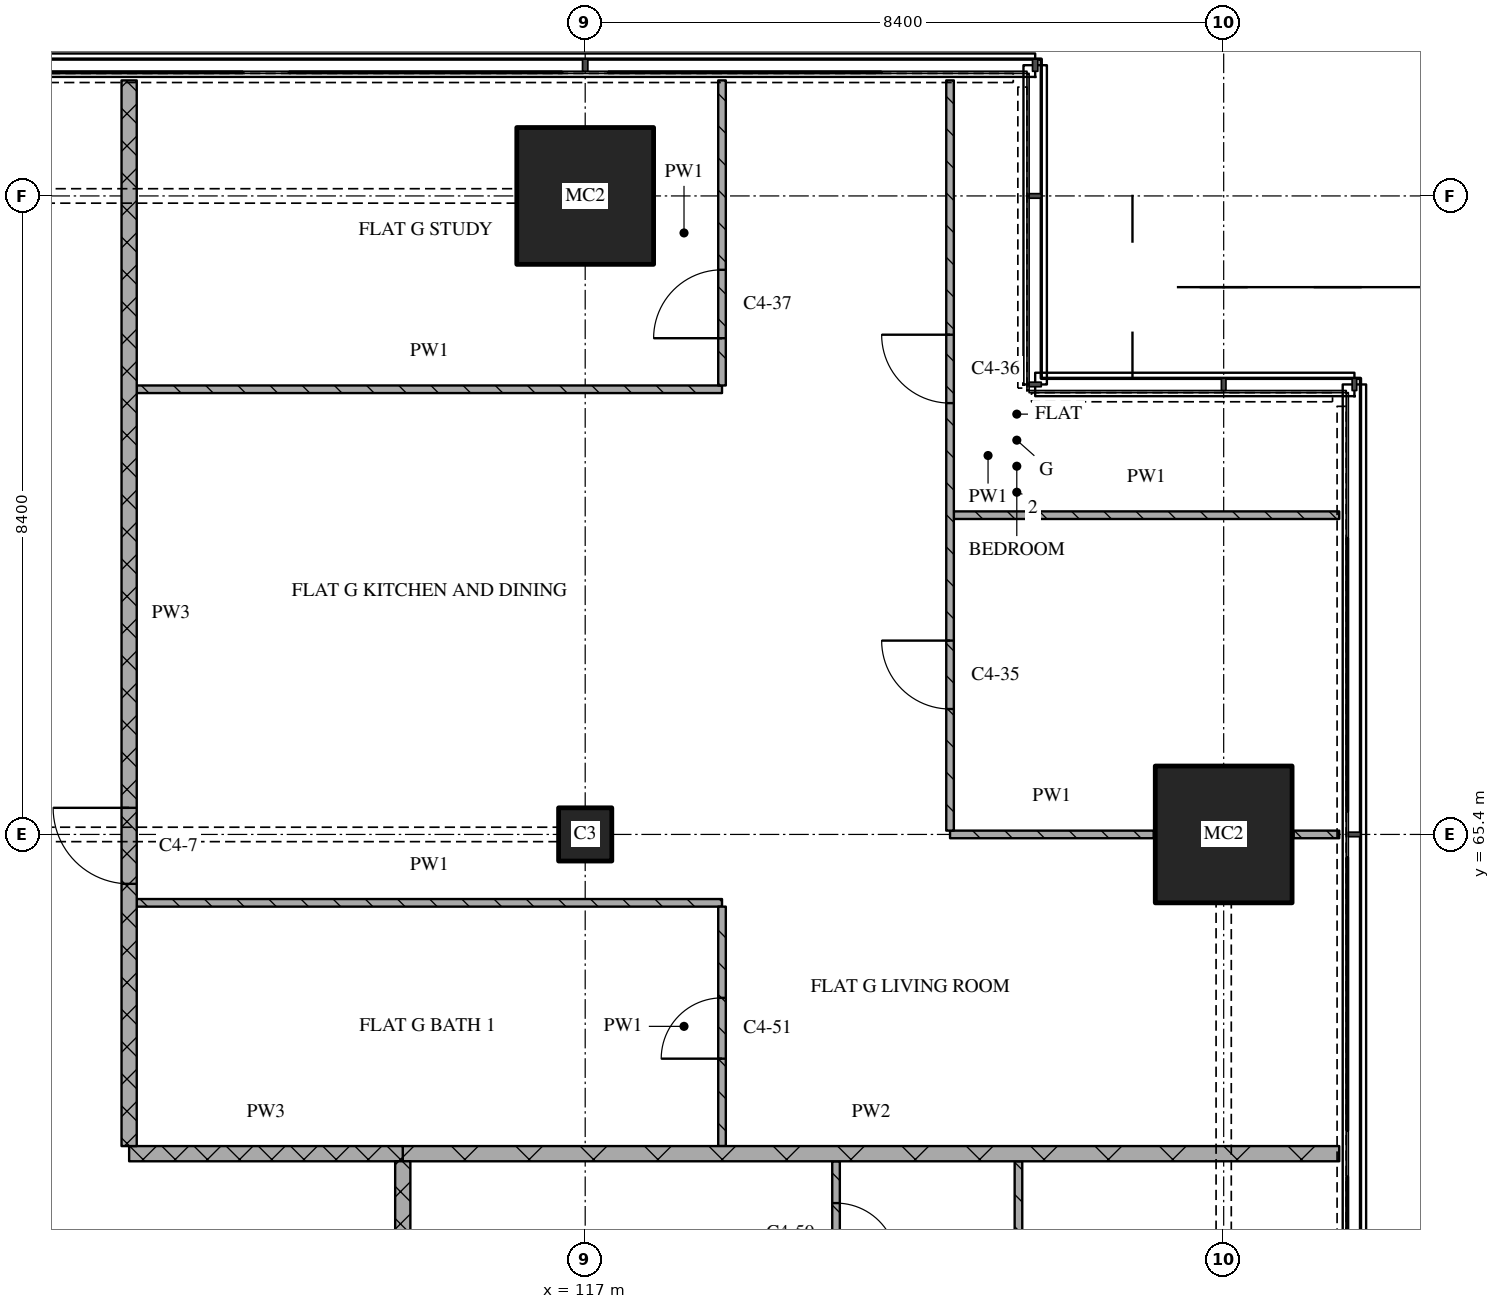
"""IFC4 building model, lengths in metres.
Left out: names, types, materials, properties, quantities, classifications, styles, units other than length and angle.
Written with IfcOpenShell. Run it as: python <this file> out.ifc"""

import sys

from ifc_helpers import new_model, si_unit, direction, frame, frame_2d, origin, origin_2d, place, context, subcontext, project, spatial, rectangle, extrude, element, fill, save


model = new_model("IFC4")
c1 = context("Model", 3, precision=1e-05, world=origin(), true_north=direction((0.0, 1.0)))
c2 = subcontext(c1, "Body", "Model", "MODEL_VIEW")
j1 = project(units=[si_unit("LENGTHUNIT", "METRE"), si_unit("PLANEANGLEUNIT", "RADIAN")], contexts=[c1])
p1 = place(None, origin())
s1 = spatial("IfcSite", under=j1, at=p1, CompositionType="ELEMENT")
p2 = place(p1, origin())
s2 = spatial("IfcBuilding", under=s1, at=p2, CompositionType="ELEMENT")
p3 = place(p2, frame((0.0, 0.0, 187.05)))
s3 = spatial("IfcBuildingStorey", under=s2, at=p3, CompositionType="ELEMENT", Elevation=187.05)
p4 = place(p3, frame((117.0, 65.4, 0.0), z_axis=(0.0, 0.0, 1.0), x_axis=(1.0, 0.0, 0.0)))
e1 = element("IfcColumn", 1, at=p4, inside=s3, PredefinedType="COLUMN", context=c2, shape_type="SweptSolid", body=[
    extrude(rectangle(XDim=0.7, YDim=0.7, at=origin_2d()), origin(), (0.0, 0.0, 1.0), 3.6),
])
for number, where, z_axis, x_axis in (
    (2, (117.0, 73.8, 0.0), (0.0, 0.0, 1.0), (1.0, 0.0, 0.0)),
    (3, (125.4, 65.4, 0.0), (0.0, 0.0, 1.0), (1.0, 0.0, 0.0)),
):
    element("IfcColumn", number, at=place(p3, frame(where, z_axis=z_axis, x_axis=x_axis)), inside=s3, PredefinedType="COLUMN", context=c2, shape_type="SweptSolid", body=[
        extrude(rectangle(XDim=1.8, YDim=1.8, at=origin_2d()), origin(), (0.0, 0.0, 1.0), 3.6),
    ])
p5 = place(p3, frame((111.0, 61.2, 0.0), z_axis=(0.0, 0.0, 1.0), x_axis=(1.0, 0.0, 0.0)))
e4 = element("IfcWall", 4, at=p5, inside=s3, PredefinedType="PARTITIONING", context=c2, shape_type="SweptSolid", body=[
    extrude(rectangle(XDim=3.6, YDim=0.2, at=frame_2d((1.8, 0.0))), origin(), (0.0, 0.0, 1.0), 3.32),
])
p6 = place(p3, frame((114.6, 61.2, 0.0), z_axis=(0.0, 0.0, 1.0), x_axis=(1.0, 0.0, 0.0)))
e5 = element("IfcWall", 5, at=p6, inside=s3, PredefinedType="PARTITIONING", context=c2, shape_type="SweptSolid", body=[
    extrude(rectangle(XDim=12.32, YDim=0.2, at=frame_2d((6.16, 0.0))), origin(), (0.0, 0.0, 1.0), 3.32),
])
p7 = place(p3, frame((111.1, 64.5, 0.0), z_axis=(0.0, 0.0, 1.0), x_axis=(1.0, 0.0, 0.0)))
e6 = element("IfcWall", 6, at=p7, inside=s3, PredefinedType="PARTITIONING", context=c2, shape_type="SweptSolid", body=[
    extrude(rectangle(XDim=7.7, YDim=0.1, at=frame_2d((3.85, 0.0))), origin(), (0.0, 0.0, 1.0), 3.32),
])
p8 = place(p3, frame((121.8, 65.4, 0.0), z_axis=(0.0, 0.0, 1.0), x_axis=(1.0, 0.0, 0.0)))
e7 = element("IfcWall", 7, at=p8, inside=s3, PredefinedType="PARTITIONING", context=c2, shape_type="SweptSolid", body=[
    extrude(rectangle(XDim=2.68, YDim=0.1, at=frame_2d((1.34, 0.0))), origin(), (0.0, 0.0, 1.0), 3.32),
])
p9 = place(p3, frame((126.32, 65.4, 0.0), z_axis=(0.0, 0.0, 1.0), x_axis=(1.0, 0.0, 0.0)))
e8 = element("IfcWall", 8, at=p9, inside=s3, PredefinedType="PARTITIONING", context=c2, shape_type="SweptSolid", body=[
    extrude(rectangle(XDim=0.6, YDim=0.1, at=frame_2d((0.3, 0.0))), origin(), (0.0, 0.0, 1.0), 3.32),
])
p10 = place(p3, frame((121.85, 69.6, 0.0), z_axis=(0.0, 0.0, 1.0), x_axis=(1.0, 0.0, 0.0)))
e9 = element("IfcWall", 9, at=p10, inside=s3, PredefinedType="PARTITIONING", context=c2, shape_type="SweptSolid", body=[
    extrude(rectangle(XDim=5.07, YDim=0.1, at=frame_2d((2.535, 0.0))), origin(), (0.0, 0.0, 1.0), 3.32),
])
p11 = place(p3, frame((111.1, 71.256, 0.0), z_axis=(0.0, 0.0, 1.0), x_axis=(1.0, 0.0, 0.0)))
e10 = element("IfcWall", 10, at=p11, inside=s3, PredefinedType="PARTITIONING", context=c2, shape_type="SweptSolid", body=[
    extrude(rectangle(XDim=7.7, YDim=0.1, at=frame_2d((3.85, 0.0))), origin(), (0.0, 0.0, 1.0), 3.32),
])
p12 = place(p3, frame((111.0, 75.32, 0.0), z_axis=(0.0, 0.0, 1.0), x_axis=(0.0, -1.0, 0.0)))
e11 = element("IfcWall", 11, at=p12, inside=s3, PredefinedType="PARTITIONING", context=c2, shape_type="SweptSolid", body=[
    extrude(rectangle(XDim=14.02, YDim=0.2, at=frame_2d((7.01, 0.0))), origin(), (0.0, 0.0, 1.0), 3.32),
])
p13 = place(p12, frame((9.57, 0.0, 0.0)))
e12 = element("IfcOpeningElement", 12, at=p13, cuts=e11, PredefinedType="OPENING", context=c2, shape_type="SweptSolid", body=[
    extrude(rectangle(XDim=1.0, YDim=2.1, at=frame_2d((0.5, 1.05))), frame((0.0, 0.11, 0.0), z_axis=(0.0, -1.0, 0.0), x_axis=(1.0, 0.0, 0.0)), (0.0, 0.0, 1.0), 0.22),
])
p14 = place(p3, frame((114.6, 61.1, 0.0), z_axis=(0.0, 0.0, 1.0), x_axis=(0.0, -1.0, 0.0)))
e13 = element("IfcWall", 13, at=p14, inside=s3, PredefinedType="PARTITIONING", context=c2, shape_type="SweptSolid", body=[
    extrude(rectangle(XDim=17.8, YDim=0.2, at=frame_2d((8.9, 0.0))), origin(), (0.0, 0.0, 1.0), 3.32),
])
p15 = place(p14, frame((6.15, 0.0, 0.0)))
e14 = element("IfcOpeningElement", 14, at=p15, cuts=e13, PredefinedType="OPENING", context=c2, shape_type="SweptSolid", body=[
    extrude(rectangle(XDim=1.0, YDim=2.1, at=frame_2d((0.5, 1.05))), frame((0.0, 0.11, 0.0), z_axis=(0.0, -1.0, 0.0), x_axis=(1.0, 0.0, 0.0)), (0.0, 0.0, 1.0), 0.22),
])
p16 = place(p3, frame((118.8, 61.3, 0.0), z_axis=(0.0, 0.0, 1.0), x_axis=(0.0, 1.0, 0.0)))
e15 = element("IfcWall", 15, at=p16, inside=s3, PredefinedType="PARTITIONING", context=c2, shape_type="SweptSolid", body=[
    extrude(rectangle(XDim=3.15, YDim=0.1, at=frame_2d((1.575, 0.0))), origin(), (0.0, 0.0, 1.0), 3.32),
])
p17 = place(p16, frame((1.15, 0.0, 0.0)))
e16 = element("IfcOpeningElement", 16, at=p17, cuts=e15, PredefinedType="OPENING", context=c2, shape_type="SweptSolid", body=[
    extrude(rectangle(XDim=0.8, YDim=2.1, at=frame_2d((0.4, 1.05))), frame((0.0, 0.06, 0.0), z_axis=(0.0, -1.0, 0.0), x_axis=(1.0, 0.0, 0.0)), (0.0, 0.0, 1.0), 0.12),
])
p18 = place(p3, frame((118.8, 71.306, 0.0), z_axis=(0.0, 0.0, 1.0), x_axis=(0.0, 1.0, 0.0)))
e17 = element("IfcWall", 17, at=p18, inside=s3, PredefinedType="PARTITIONING", context=c2, shape_type="SweptSolid", body=[
    extrude(rectangle(XDim=4.014, YDim=0.1, at=frame_2d((2.007, 0.0))), origin(), (0.0, 0.0, 1.0), 3.32),
])
p19 = place(p18, frame((0.622, 0.0, 0.0)))
e18 = element("IfcOpeningElement", 18, at=p19, cuts=e17, PredefinedType="OPENING", context=c2, shape_type="SweptSolid", body=[
    extrude(rectangle(XDim=0.9, YDim=2.1, at=frame_2d((0.45, 1.05))), frame((0.0, 0.06, 0.0), z_axis=(0.0, -1.0, 0.0), x_axis=(1.0, 0.0, 0.0)), (0.0, 0.0, 1.0), 0.12),
])
p20 = place(p3, frame((120.3, 55.25, 0.0), z_axis=(0.0, 0.0, 1.0), x_axis=(0.0, 1.0, 0.0)))
e19 = element("IfcWall", 19, at=p20, inside=s3, PredefinedType="PARTITIONING", context=c2, shape_type="SweptSolid", body=[
    extrude(rectangle(XDim=5.85, YDim=0.1, at=frame_2d((2.925, 0.0))), origin(), (0.0, 0.0, 1.0), 3.32),
])
p21 = place(p20, frame((4.5, 0.0, 0.0)))
e20 = element("IfcOpeningElement", 20, at=p21, cuts=e19, PredefinedType="OPENING", context=c2, shape_type="SweptSolid", body=[
    extrude(rectangle(XDim=0.8, YDim=2.1, at=frame_2d((0.4, 1.05))), frame((0.0, 0.06, 0.0), z_axis=(0.0, -1.0, 0.0), x_axis=(1.0, 0.0, 0.0)), (0.0, 0.0, 1.0), 0.12),
])
p22 = place(p3, frame((121.8, 75.32, 0.0), z_axis=(0.0, 0.0, 1.0), x_axis=(0.0, -1.0, 0.0)))
e21 = element("IfcWall", 21, at=p22, inside=s3, PredefinedType="PARTITIONING", context=c2, shape_type="SweptSolid", body=[
    extrude(rectangle(XDim=9.87, YDim=0.1, at=frame_2d((4.935, 0.0))), origin(), (0.0, 0.0, 1.0), 3.32),
])
p23 = place(p22, frame((3.346, 0.0, 0.0)))
e22 = element("IfcOpeningElement", 22, at=p23, cuts=e21, PredefinedType="OPENING", context=c2, shape_type="SweptSolid", body=[
    extrude(rectangle(XDim=0.9, YDim=2.1, at=frame_2d((0.45, 1.05))), frame((0.0, 0.06, 0.0), z_axis=(0.0, -1.0, 0.0), x_axis=(1.0, 0.0, 0.0)), (0.0, 0.0, 1.0), 0.12),
])
p24 = place(p22, frame((7.37, 0.0, 0.0)))
e23 = element("IfcOpeningElement", 23, at=p24, cuts=e21, PredefinedType="OPENING", context=c2, shape_type="SweptSolid", body=[
    extrude(rectangle(XDim=0.9, YDim=2.1, at=frame_2d((0.45, 1.05))), frame((0.0, 0.06, 0.0), z_axis=(0.0, -1.0, 0.0), x_axis=(1.0, 0.0, 0.0)), (0.0, 0.0, 1.0), 0.12),
])
p25 = place(p3, frame((122.7, 61.1, 0.0), z_axis=(0.0, 0.0, 1.0), x_axis=(0.0, -1.0, 0.0)))
e24 = element("IfcWall", 24, at=p25, inside=s3, PredefinedType="PARTITIONING", context=c2, shape_type="SweptSolid", body=[
    extrude(rectangle(XDim=8.25, YDim=0.1, at=frame_2d((4.125, 0.0))), origin(), (0.0, 0.0, 1.0), 3.32),
])
p26 = place(p25, frame((3.65, 0.0, 0.0)))
e25 = element("IfcOpeningElement", 25, at=p26, cuts=e24, PredefinedType="OPENING", context=c2, shape_type="SweptSolid", body=[
    extrude(rectangle(XDim=0.9, YDim=2.1, at=frame_2d((0.45, 1.05))), frame((0.0, 0.06, 0.0), z_axis=(0.0, -1.0, 0.0), x_axis=(1.0, 0.0, 0.0)), (0.0, 0.0, 1.0), 0.12),
])
p27 = place(p13, origin())
e26 = element("IfcDoor", 26, at=p27, inside=s3, OperationType="SINGLE_SWING_RIGHT", PredefinedType="DOOR", context=c2, shape_type="SweptSolid", body=[
    extrude(rectangle(XDim=1.0, YDim=2.1, at=frame_2d((0.5, 1.05))), frame((0.0, 0.025, 0.0), z_axis=(0.0, -1.0, 0.0), x_axis=(1.0, 0.0, 0.0)), (0.0, 0.0, 1.0), 0.05),
])
fill(e12, e26)
p28 = place(p17, origin())
e27 = element("IfcDoor", 27, at=p28, inside=s3, OperationType="SINGLE_SWING_LEFT", PredefinedType="DOOR", context=c2, shape_type="SweptSolid", body=[
    extrude(rectangle(XDim=0.8, YDim=2.1, at=frame_2d((0.4, 1.05))), frame((0.0, 0.025, 0.0), z_axis=(0.0, -1.0, 0.0), x_axis=(1.0, 0.0, 0.0)), (0.0, 0.0, 1.0), 0.05),
])
fill(e16, e27)
p29 = place(p19, origin())
e28 = element("IfcDoor", 28, at=p29, inside=s3, OperationType="SINGLE_SWING_LEFT", PredefinedType="DOOR", context=c2, shape_type="SweptSolid", body=[
    extrude(rectangle(XDim=0.9, YDim=2.1, at=frame_2d((0.45, 1.05))), frame((0.0, 0.025, 0.0), z_axis=(0.0, -1.0, 0.0), x_axis=(1.0, 0.0, 0.0)), (0.0, 0.0, 1.0), 0.05),
])
fill(e18, e28)
p30 = place(p21, origin())
e29 = element("IfcDoor", 29, at=p30, inside=s3, OperationType="SINGLE_SWING_RIGHT", PredefinedType="DOOR", context=c2, shape_type="SweptSolid", body=[
    extrude(rectangle(XDim=0.8, YDim=2.1, at=frame_2d((0.4, 1.05))), frame((0.0, 0.025, 0.0), z_axis=(0.0, -1.0, 0.0), x_axis=(1.0, 0.0, 0.0)), (0.0, 0.0, 1.0), 0.05),
])
fill(e20, e29)
p31 = place(p23, origin())
e30 = element("IfcDoor", 30, at=p31, inside=s3, OperationType="SINGLE_SWING_RIGHT", PredefinedType="DOOR", context=c2, shape_type="SweptSolid", body=[
    extrude(rectangle(XDim=0.9, YDim=2.1, at=frame_2d((0.45, 1.05))), frame((0.0, 0.025, 0.0), z_axis=(0.0, -1.0, 0.0), x_axis=(1.0, 0.0, 0.0)), (0.0, 0.0, 1.0), 0.05),
])
fill(e22, e30)
p32 = place(p24, origin())
e31 = element("IfcDoor", 31, at=p32, inside=s3, OperationType="SINGLE_SWING_RIGHT", PredefinedType="DOOR", context=c2, shape_type="SweptSolid", body=[
    extrude(rectangle(XDim=0.9, YDim=2.1, at=frame_2d((0.45, 1.05))), frame((0.0, 0.025, 0.0), z_axis=(0.0, -1.0, 0.0), x_axis=(1.0, 0.0, 0.0)), (0.0, 0.0, 1.0), 0.05),
])
fill(e23, e31)
save(model, sys.argv[1])
